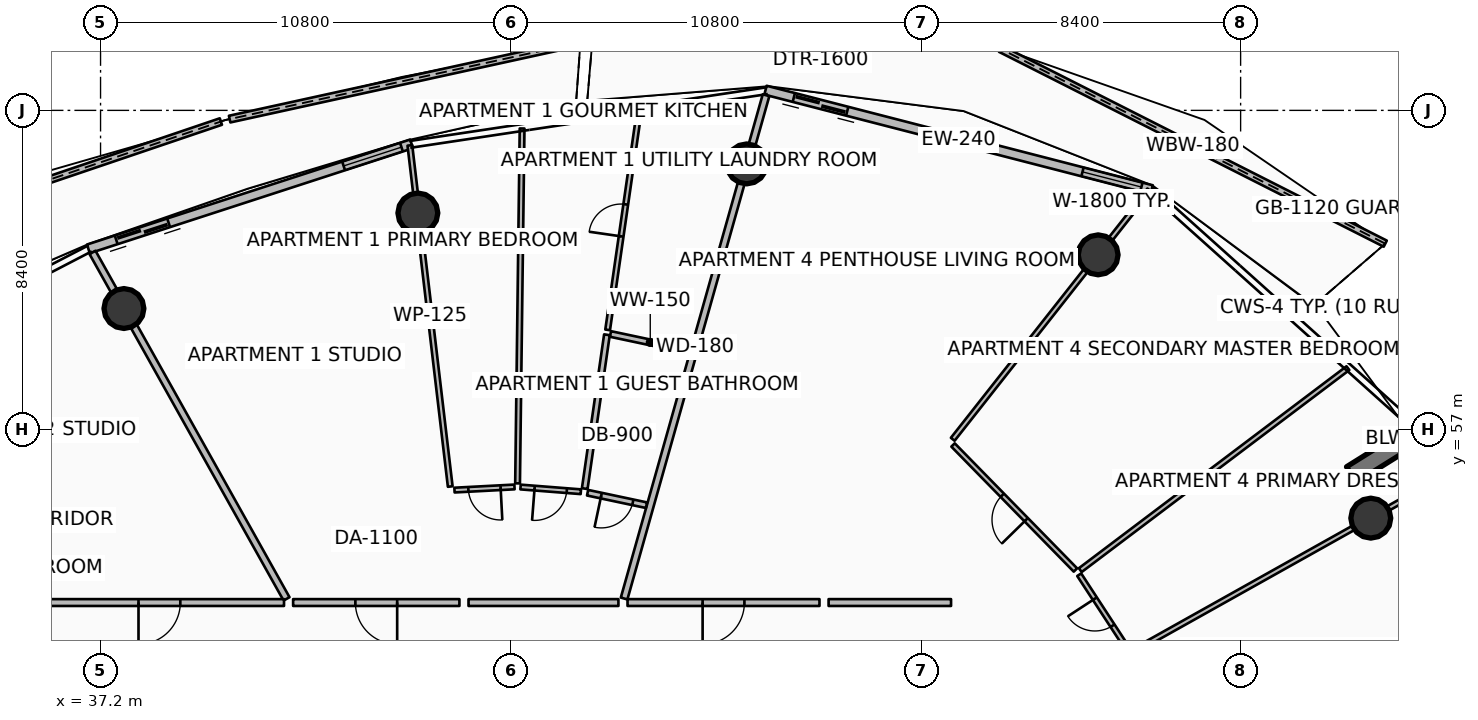
"""IFC4 building model, lengths in metres.
Left out: names, types, materials, properties, quantities, classifications, styles, units other than length and angle.
Written with IfcOpenShell. Run it as: python <this file> out.ifc"""

import sys

from ifc_helpers import new_model, si_unit, direction, frame, frame_2d, origin, origin_2d, place, context, subcontext, project, spatial, polyline, rectangle, circle, outline, extrude, element, fill, save


model = new_model("IFC4")
c1 = context("Model", 3, precision=1e-05, world=origin(), true_north=direction((0.0, 1.0)))
c2 = subcontext(c1, "Body", "Model", "MODEL_VIEW")
j1 = project(units=[si_unit("LENGTHUNIT", "METRE"), si_unit("PLANEANGLEUNIT", "RADIAN")], contexts=[c1])
p1 = place(None, origin())
s1 = spatial("IfcSite", under=j1, at=p1, CompositionType="ELEMENT")
p2 = place(p1, origin())
s2 = spatial("IfcBuilding", under=s1, at=p2, CompositionType="ELEMENT")
p3 = place(p2, frame((0.0, 0.0, 202.8)))
s3 = spatial("IfcBuildingStorey", under=s2, at=p3, CompositionType="ELEMENT", Elevation=202.8)
p4 = place(p3, frame((70.114, 55.818, 0.0), z_axis=(0.0, 0.0, 1.0), x_axis=(0.848033572426, 0.529942506352, 0.0)))
e1 = element("IfcWall", 1, at=p4, inside=s3, PredefinedType="SOLIDWALL", context=c2, shape_type="SweptSolid", body=[
    extrude(rectangle(XDim=3.5, YDim=0.48, at=frame_2d((1.75, 0.0))), origin(), (0.0, 0.0, 1.0), 3.75),
])
for number, where, z_axis, x_axis in (
    (2, (70.625, 54.671, 0.0), (0.0, 0.0, 1.0), (1.0, 0.0, 0.0)),
    (3, (63.451, 61.599, 0.0), (0.0, 0.0, 1.0), (1.0, 0.0, 0.0)),
    (4, (54.202, 63.992, 0.0), (0.0, 0.0, 1.0), (1.0, 0.0, 0.0)),
    (5, (45.55, 62.7, 0.0), (0.0, 0.0, 1.0), (1.0, 0.0, 0.0)),
    (6, (37.815, 60.186, 0.0), (0.0, 0.0, 1.0), (1.0, 0.0, 0.0)),
):
    element("IfcColumn", number, at=place(p3, frame(where, z_axis=z_axis, x_axis=x_axis)), inside=s3, PredefinedType="COLUMN", context=c2, shape_type="SweptSolid", body=[
        extrude(circle(Radius=0.525, at=origin_2d()), origin(), (0.0, 0.0, 1.0), 3.5),
    ])
p5 = place(p3, frame((71.006, 61.893, 0.0), z_axis=(0.0, 0.0, 1.0), x_axis=(-0.892126203774, 0.451786273076, 0.0)))
e7 = element("IfcWall", 7, at=p5, inside=s3, PredefinedType="PARAPET", context=c2, shape_type="SweptSolid", body=[
    extrude(outline(polyline([(0.0, 0.0), (11.347, 0.0), (11.347, 1.348), (5.674, 1.562), (0.0, 1.747), (0.0, 0.0)])), frame((0.0, 0.09, 0.0), z_axis=(0.0, -1.0, 0.0), x_axis=(1.0, 0.0, 0.0)), (0.0, 0.0, 1.0), 0.18),
])
p6 = place(p3, frame((49.828, 67.193, 0.0), z_axis=(0.0, 0.0, 1.0), x_axis=(-0.976834914213, -0.213994276499, 0.0)))
e8 = element("IfcWall", 8, at=p6, inside=s3, PredefinedType="PARAPET", context=c2, shape_type="SweptSolid", body=[
    extrude(outline(polyline([(0.0, 0.0), (9.45, 0.0), (9.45, 1.348), (4.725, 1.182), (0.0, 1.12), (0.0, 0.0)])), frame((0.0, 0.09, 0.0), z_axis=(0.0, -1.0, 0.0), x_axis=(1.0, 0.0, 0.0)), (0.0, 0.0, 1.0), 0.18),
])
p7 = place(p3, frame((40.366, 65.106, 0.0), z_axis=(0.0, 0.0, 1.0), x_axis=(-0.947048433124, -0.32109074312, 0.0)))
e9 = element("IfcWall", 9, at=p7, inside=s3, PredefinedType="PARAPET", context=c2, shape_type="SweptSolid", body=[
    extrude(outline(polyline([(0.0, 0.0), (9.736, 0.0), (9.736, 1.747), (4.868, 1.562), (0.0, 1.348), (0.0, 0.0)])), frame((0.0, 0.09, 0.0), z_axis=(0.0, -1.0, 0.0), x_axis=(1.0, 0.0, 0.0)), (0.0, 0.0, 1.0), 0.18),
])
p8 = place(p3, frame((64.86, 63.313, 0.0), z_axis=(0.0, 0.0, 1.0), x_axis=(-0.968374028006, 0.249502989727, 0.0)))
e10 = element("IfcWall", 10, at=p8, inside=s3, PredefinedType="SOLIDWALL", context=c2, shape_type="SweptSolid", body=[
    extrude(rectangle(XDim=10.494, YDim=0.24, at=frame_2d((5.247, 0.0))), origin(), (0.0, 0.0, 1.0), 2.45),
])
p9 = place(p8, frame((8.274, 0.0, 0.0)))
e11 = element("IfcOpeningElement", 11, at=p9, cuts=e10, PredefinedType="OPENING", context=c2, shape_type="SweptSolid", body=[
    extrude(rectangle(XDim=1.45, YDim=2.15, at=frame_2d((0.725, 1.075))), frame((0.0, 0.13, 0.0), z_axis=(0.0, -1.0, 0.0), x_axis=(1.0, 0.0, 0.0)), (0.0, 0.0, 1.0), 0.26),
])
p10 = place(p8, frame((0.28, 0.0, 0.65)))
e12 = element("IfcOpeningElement", 12, at=p10, cuts=e10, PredefinedType="OPENING", context=c2, shape_type="SweptSolid", body=[
    extrude(rectangle(XDim=1.6, YDim=1.5, at=frame_2d((0.8, 0.75))), frame((0.0, 0.13, 0.0), z_axis=(0.0, -1.0, 0.0), x_axis=(1.0, 0.0, 0.0)), (0.0, 0.0, 1.0), 0.26),
])
p11 = place(p3, frame((45.384, 64.519, 0.0), z_axis=(0.0, 0.0, 1.0), x_axis=(-0.951058543936, -0.309010753869, 0.0)))
e13 = element("IfcWall", 13, at=p11, inside=s3, PredefinedType="SOLIDWALL", context=c2, shape_type="SweptSolid", body=[
    extrude(rectangle(XDim=8.942, YDim=0.24, at=frame_2d((4.471, 0.0))), origin(), (0.0, 0.0, 1.0), 2.45),
])
p12 = place(p11, frame((6.722, 0.0, 0.0)))
e14 = element("IfcOpeningElement", 14, at=p12, cuts=e13, PredefinedType="OPENING", context=c2, shape_type="SweptSolid", body=[
    extrude(rectangle(XDim=1.45, YDim=2.15, at=frame_2d((0.725, 1.075))), frame((0.0, 0.13, 0.0), z_axis=(0.0, -1.0, 0.0), x_axis=(1.0, 0.0, 0.0)), (0.0, 0.0, 1.0), 0.26),
])
p13 = place(p11, frame((0.28, 0.0, 0.65)))
e15 = element("IfcOpeningElement", 15, at=p13, cuts=e13, PredefinedType="OPENING", context=c2, shape_type="SweptSolid", body=[
    extrude(rectangle(XDim=1.6, YDim=1.5, at=frame_2d((0.8, 0.75))), frame((0.0, 0.13, 0.0), z_axis=(0.0, -1.0, 0.0), x_axis=(1.0, 0.0, 0.0)), (0.0, 0.0, 1.0), 0.26),
])
p14 = place(p3, frame((50.977, 52.556, 0.0), z_axis=(0.0, 0.0, 1.0), x_axis=(0.271443307373, 0.962454430548, 0.0)))
e16 = element("IfcWall", 16, at=p14, inside=s3, PredefinedType="PARTITIONING", context=c2, shape_type="SweptSolid", body=[
    extrude(rectangle(XDim=13.759, YDim=0.18, at=frame_2d((6.88, 0.0))), origin(), (0.0, 0.0, 1.0), 2.94),
])
p15 = place(p3, frame((42.094, 52.546, 0.0), z_axis=(0.0, 0.0, 1.0), x_axis=(-0.488614041717, 0.872500039104, 0.0)))
e17 = element("IfcWall", 17, at=p15, inside=s3, PredefinedType="PARTITIONING", context=c2, shape_type="SweptSolid", body=[
    extrude(rectangle(XDim=10.448, YDim=0.18, at=frame_2d((5.224, 0.0))), origin(), (0.0, 0.0, 1.0), 2.94),
])
p16 = place(p3, frame((46.643, 52.45, 0.0), z_axis=(0.0, 0.0, 1.0), x_axis=(-1.0, 0.0, 0.0)))
e18 = element("IfcWall", 18, at=p16, inside=s3, PredefinedType="PARTITIONING", context=c2, shape_type="SweptSolid", body=[
    extrude(rectangle(XDim=4.376, YDim=0.18, at=frame_2d((2.188, 0.0))), origin(), (0.0, 0.0, 1.0), 2.94),
])
p17 = place(p16, frame((1.638, 0.0, 0.0)))
e19 = element("IfcOpeningElement", 19, at=p17, cuts=e18, PredefinedType="OPENING", context=c2, shape_type="SweptSolid", body=[
    extrude(rectangle(XDim=1.1, YDim=2.1, at=frame_2d((0.55, 1.05))), frame((0.0, 0.1, 0.0), z_axis=(0.0, -1.0, 0.0), x_axis=(1.0, 0.0, 0.0)), (0.0, 0.0, 1.0), 0.2),
])
p18 = place(p3, frame((50.827, 52.45, 0.0), z_axis=(0.0, 0.0, 1.0), x_axis=(-1.0, 0.0, 0.0)))
e20 = element("IfcWall", 20, at=p18, inside=s3, PredefinedType="PARTITIONING", context=c2, shape_type="SweptSolid", body=[
    extrude(rectangle(XDim=3.944, YDim=0.18, at=frame_2d((1.972, 0.0))), origin(), (0.0, 0.0, 1.0), 2.94),
])
p19 = place(p3, frame((46.402, 55.503, 0.0), z_axis=(0.0, 0.0, 1.0), x_axis=(-0.117526089467, 0.993069795279, 0.0)))
e21 = element("IfcWall", 21, at=p19, inside=s3, PredefinedType="PARTITIONING", context=c2, shape_type="SweptSolid", body=[
    extrude(rectangle(XDim=9.039, YDim=0.125, at=frame_2d((4.519, 0.0))), origin(), (0.0, 0.0, 1.0), 2.94),
])
p20 = place(p3, frame((51.566, 55.011, 0.0), z_axis=(0.0, 0.0, 1.0), x_axis=(-0.978219904541, 0.207571236833, 0.0)))
e22 = element("IfcWall", 22, at=p20, inside=s3, PredefinedType="PARTITIONING", context=c2, shape_type="SweptSolid", body=[
    extrude(rectangle(XDim=1.584, YDim=0.15, at=frame_2d((0.792, 0.0))), origin(), (0.0, 0.0, 1.0), 2.94),
])
p21 = place(p20, frame((0.367, 0.0, 0.0)))
e23 = element("IfcOpeningElement", 23, at=p21, cuts=e22, PredefinedType="OPENING", context=c2, shape_type="SweptSolid", body=[
    extrude(rectangle(XDim=0.85, YDim=2.06, at=frame_2d((0.425, 1.03))), frame((0.0, 0.085, 0.0), z_axis=(0.0, -1.0, 0.0), x_axis=(1.0, 0.0, 0.0)), (0.0, 0.0, 1.0), 0.17),
])
p22 = place(p3, frame((52.711, 59.073, 0.0), z_axis=(0.0, 0.0, 1.0), x_axis=(-0.978208139302, 0.207626675075, 0.0)))
e24 = element("IfcWall", 24, at=p22, inside=s3, PredefinedType="PARTITIONING", context=c2, shape_type="SweptSolid", body=[
    extrude(rectangle(XDim=2.139, YDim=0.15, at=frame_2d((1.069, 0.0))), origin(), (0.0, 0.0, 1.0), 2.94),
])
p23 = place(p3, frame((49.941, 55.448, 0.0), z_axis=(0.0, 0.0, 1.0), x_axis=(0.142850308916, 0.989744304981, 0.0)))
e25 = element("IfcWall", 25, at=p23, inside=s3, PredefinedType="PARTITIONING", context=c2, shape_type="SweptSolid", body=[
    extrude(rectangle(XDim=4.09, YDim=0.15, at=frame_2d((2.045, 0.0))), origin(), (0.0, 0.0, 1.0), 2.94),
])
p24 = place(p3, frame((50.544, 59.625, 0.0), z_axis=(0.0, 0.0, 1.0), x_axis=(0.142847588942, 0.989744697553, 0.0)))
e26 = element("IfcWall", 26, at=p24, inside=s3, PredefinedType="PARTITIONING", context=c2, shape_type="SweptSolid", body=[
    extrude(rectangle(XDim=5.823, YDim=0.125, at=frame_2d((2.912, 0.0))), origin(), (0.0, 0.0, 1.0), 2.94),
])
p25 = place(p24, frame((2.487, 0.0, 0.0)))
e27 = element("IfcOpeningElement", 27, at=p25, cuts=e26, PredefinedType="OPENING", context=c2, shape_type="SweptSolid", body=[
    extrude(rectangle(XDim=0.85, YDim=2.06, at=frame_2d((0.425, 1.03))), frame((0.0, 0.073, 0.0), z_axis=(0.0, -1.0, 0.0), x_axis=(1.0, 0.0, 0.0)), (0.0, 0.0, 1.0), 0.145),
])
p26 = place(p3, frame((48.173, 55.586, 0.0), z_axis=(0.0, 0.0, 1.0), x_axis=(0.012758799277, 0.999918603208, 0.0)))
e28 = element("IfcWall", 28, at=p26, inside=s3, PredefinedType="PARTITIONING", context=c2, shape_type="SweptSolid", body=[
    extrude(rectangle(XDim=9.338, YDim=0.125, at=frame_2d((4.669, 0.0))), origin(), (0.0, 0.0, 1.0), 2.94),
])
p27 = place(p3, frame((49.838, 55.365, 0.0), z_axis=(0.0, 0.0, 1.0), x_axis=(-0.996945175666, 0.078104524306, 0.0)))
e29 = element("IfcWall", 29, at=p27, inside=s3, PredefinedType="PARTITIONING", context=c2, shape_type="SweptSolid", body=[
    extrude(rectangle(XDim=1.591, YDim=0.125, at=frame_2d((0.795, 0.0))), origin(), (0.0, 0.0, 1.0), 2.94),
])
p28 = place(p27, frame((0.371, 0.0, 0.0)))
e30 = element("IfcOpeningElement", 30, at=p28, cuts=e29, PredefinedType="OPENING", context=c2, shape_type="SweptSolid", body=[
    extrude(rectangle(XDim=0.85, YDim=2.06, at=frame_2d((0.425, 1.03))), frame((0.0, 0.073, 0.0), z_axis=(0.0, -1.0, 0.0), x_axis=(1.0, 0.0, 0.0)), (0.0, 0.0, 1.0), 0.145),
])
p29 = place(p3, frame((48.092, 55.492, 0.0), z_axis=(0.0, 0.0, 1.0), x_axis=(-0.998620813703, -0.052502099375, 0.0)))
e31 = element("IfcWall", 31, at=p29, inside=s3, PredefinedType="PARTITIONING", context=c2, shape_type="SweptSolid", body=[
    extrude(rectangle(XDim=1.581, YDim=0.125, at=frame_2d((0.791, 0.0))), origin(), (0.0, 0.0, 1.0), 2.94),
])
p30 = place(p29, frame((0.365, 0.0, 0.0)))
e32 = element("IfcOpeningElement", 32, at=p30, cuts=e31, PredefinedType="OPENING", context=c2, shape_type="SweptSolid", body=[
    extrude(rectangle(XDim=0.85, YDim=2.06, at=frame_2d((0.425, 1.03))), frame((0.0, 0.073, 0.0), z_axis=(0.0, -1.0, 0.0), x_axis=(1.0, 0.0, 0.0)), (0.0, 0.0, 1.0), 0.145),
])
p31 = place(p3, frame((42.028, 52.45, 0.0), z_axis=(0.0, 0.0, 1.0), x_axis=(-1.0, 0.0, 0.0)))
e33 = element("IfcWall", 33, at=p31, inside=s3, PredefinedType="PARTITIONING", context=c2, shape_type="SweptSolid", body=[
    extrude(rectangle(XDim=6.558, YDim=0.18, at=frame_2d((3.279, 0.0))), origin(), (0.0, 0.0, 1.0), 2.94),
])
p32 = place(p31, frame((2.729, 0.0, 0.0)))
e34 = element("IfcOpeningElement", 34, at=p32, cuts=e33, PredefinedType="OPENING", context=c2, shape_type="SweptSolid", body=[
    extrude(rectangle(XDim=1.1, YDim=2.1, at=frame_2d((0.55, 1.05))), frame((0.0, 0.1, 0.0), z_axis=(0.0, -1.0, 0.0), x_axis=(1.0, 0.0, 0.0)), (0.0, 0.0, 1.0), 0.2),
])
p33 = place(p3, frame((56.118, 52.45, 0.0), z_axis=(0.0, 0.0, 1.0), x_axis=(-1.0, 0.0, 0.0)))
e35 = element("IfcWall", 35, at=p33, inside=s3, PredefinedType="PARTITIONING", context=c2, shape_type="SweptSolid", body=[
    extrude(rectangle(XDim=5.051, YDim=0.18, at=frame_2d((2.525, 0.0))), origin(), (0.0, 0.0, 1.0), 2.94),
])
p34 = place(p33, frame((1.975, 0.0, 0.0)))
e36 = element("IfcOpeningElement", 36, at=p34, cuts=e35, PredefinedType="OPENING", context=c2, shape_type="SweptSolid", body=[
    extrude(rectangle(XDim=1.1, YDim=2.1, at=frame_2d((0.55, 1.05))), frame((0.0, 0.1, 0.0), z_axis=(0.0, -1.0, 0.0), x_axis=(1.0, 0.0, 0.0)), (0.0, 0.0, 1.0), 0.2),
])
p35 = place(p3, frame((59.58, 52.45, 0.0), z_axis=(0.0, 0.0, 1.0), x_axis=(-1.0, 0.0, 0.0)))
e37 = element("IfcWall", 37, at=p35, inside=s3, PredefinedType="PARTITIONING", context=c2, shape_type="SweptSolid", body=[
    extrude(rectangle(XDim=3.222, YDim=0.18, at=frame_2d((1.611, 0.0))), origin(), (0.0, 0.0, 1.0), 2.94),
])
p36 = place(p3, frame((64.383, 51.175, 0.0), z_axis=(0.0, 0.0, 1.0), x_axis=(0.872496427588, 0.488620490611, 0.0)))
e38 = element("IfcWall", 38, at=p36, inside=s3, PredefinedType="PARTITIONING", context=c2, shape_type="SweptSolid", body=[
    extrude(rectangle(XDim=9.118, YDim=0.125, at=frame_2d((4.559, 0.0))), origin(), (0.0, 0.0, 1.0), 2.94),
])
p37 = place(p3, frame((59.625, 56.746, 0.0), z_axis=(0.0, 0.0, 1.0), x_axis=(0.619083134383, 0.785325456561, 0.0)))
e39 = element("IfcWall", 39, at=p37, inside=s3, PredefinedType="PARTITIONING", context=c2, shape_type="SweptSolid", body=[
    extrude(rectangle(XDim=8.353, YDim=0.125, at=frame_2d((4.177, 0.0))), origin(), (0.0, 0.0, 1.0), 2.94),
])
p38 = place(p3, frame((62.981, 53.303, 0.0), z_axis=(0.0, 0.0, 1.0), x_axis=(0.798266473747, 0.602304438711, 0.0)))
e40 = element("IfcWall", 40, at=p38, inside=s3, PredefinedType="PARTITIONING", context=c2, shape_type="SweptSolid", body=[
    extrude(rectangle(XDim=8.822, YDim=0.125, at=frame_2d((4.411, 0.0))), origin(), (0.0, 0.0, 1.0), 2.94),
])
p39 = place(p3, frame((64.241, 51.21, 0.0), z_axis=(0.0, 0.0, 1.0), x_axis=(-0.546782970229, 0.837274377649, 0.0)))
e41 = element("IfcWall", 41, at=p39, inside=s3, PredefinedType="PARTITIONING", context=c2, shape_type="SweptSolid", body=[
    extrude(rectangle(XDim=2.356, YDim=0.125, at=frame_2d((1.178, 0.0))), origin(), (0.0, 0.0, 1.0), 2.94),
])
p40 = place(p39, frame((0.753, 0.0, 0.0)))
e42 = element("IfcOpeningElement", 42, at=p40, cuts=e41, PredefinedType="OPENING", context=c2, shape_type="SweptSolid", body=[
    extrude(rectangle(XDim=0.85, YDim=2.06, at=frame_2d((0.425, 1.03))), frame((0.0, 0.073, 0.0), z_axis=(0.0, -1.0, 0.0), x_axis=(1.0, 0.0, 0.0)), (0.0, 0.0, 1.0), 0.145),
])
p41 = place(p3, frame((62.853, 53.306, 0.0), z_axis=(0.0, 0.0, 1.0), x_axis=(-0.699562743434, 0.714571177699, 0.0)))
e43 = element("IfcWall", 43, at=p41, inside=s3, PredefinedType="PARTITIONING", context=c2, shape_type="SweptSolid", body=[
    extrude(rectangle(XDim=4.604, YDim=0.125, at=frame_2d((2.302, 0.0))), origin(), (0.0, 0.0, 1.0), 2.94),
])
p42 = place(p41, frame((1.852, 0.0, 0.0)))
e44 = element("IfcOpeningElement", 44, at=p42, cuts=e43, PredefinedType="OPENING", context=c2, shape_type="SweptSolid", body=[
    extrude(rectangle(XDim=0.9, YDim=2.08, at=frame_2d((0.45, 1.04))), frame((0.0, 0.073, 0.0), z_axis=(0.0, -1.0, 0.0), x_axis=(1.0, 0.0, 0.0)), (0.0, 0.0, 1.0), 0.145),
])
p43 = place(p9, origin())
e45 = element("IfcDoor", 45, at=p43, inside=s3, OperationType="DOUBLE_DOOR_SLIDING", PredefinedType="DOOR", context=c2, shape_type="SweptSolid", body=[
    extrude(rectangle(XDim=1.45, YDim=2.15, at=frame_2d((0.725, 1.075))), frame((0.0, 0.025, 0.0), z_axis=(0.0, -1.0, 0.0), x_axis=(1.0, 0.0, 0.0)), (0.0, 0.0, 1.0), 0.05),
])
fill(e11, e45)
p44 = place(p10, origin())
e46 = element("IfcWindow", 46, at=p44, inside=s3, PartitioningType="SINGLE_PANEL", PredefinedType="WINDOW", context=c2, shape_type="SweptSolid", body=[
    extrude(rectangle(XDim=1.6, YDim=1.5, at=frame_2d((0.8, 0.75))), frame((0.0, 0.03, 0.0), z_axis=(0.0, -1.0, 0.0), x_axis=(1.0, 0.0, 0.0)), (0.0, 0.0, 1.0), 0.06),
])
fill(e12, e46)
p45 = place(p12, origin())
e47 = element("IfcDoor", 47, at=p45, inside=s3, OperationType="DOUBLE_DOOR_SLIDING", PredefinedType="DOOR", context=c2, shape_type="SweptSolid", body=[
    extrude(rectangle(XDim=1.45, YDim=2.15, at=frame_2d((0.725, 1.075))), frame((0.0, 0.025, 0.0), z_axis=(0.0, -1.0, 0.0), x_axis=(1.0, 0.0, 0.0)), (0.0, 0.0, 1.0), 0.05),
])
fill(e14, e47)
p46 = place(p13, origin())
e48 = element("IfcWindow", 48, at=p46, inside=s3, PartitioningType="SINGLE_PANEL", PredefinedType="WINDOW", context=c2, shape_type="SweptSolid", body=[
    extrude(rectangle(XDim=1.6, YDim=1.5, at=frame_2d((0.8, 0.75))), frame((0.0, 0.03, 0.0), z_axis=(0.0, -1.0, 0.0), x_axis=(1.0, 0.0, 0.0)), (0.0, 0.0, 1.0), 0.06),
])
fill(e15, e48)
p47 = place(p17, origin())
e49 = element("IfcDoor", 49, at=p47, inside=s3, OperationType="SINGLE_SWING_LEFT", PredefinedType="DOOR", context=c2, shape_type="SweptSolid", body=[
    extrude(rectangle(XDim=1.1, YDim=2.1, at=frame_2d((0.55, 1.05))), frame((0.0, 0.025, 0.0), z_axis=(0.0, -1.0, 0.0), x_axis=(1.0, 0.0, 0.0)), (0.0, 0.0, 1.0), 0.05),
])
fill(e19, e49)
p48 = place(p21, origin())
e50 = element("IfcDoor", 50, at=p48, inside=s3, OperationType="SINGLE_SWING_RIGHT", PredefinedType="DOOR", context=c2, shape_type="SweptSolid", body=[
    extrude(rectangle(XDim=0.85, YDim=2.06, at=frame_2d((0.425, 1.03))), frame((0.0, 0.025, 0.0), z_axis=(0.0, -1.0, 0.0), x_axis=(1.0, 0.0, 0.0)), (0.0, 0.0, 1.0), 0.05),
])
fill(e23, e50)
p49 = place(p25, origin())
e51 = element("IfcDoor", 51, at=p49, inside=s3, OperationType="SINGLE_SWING_LEFT", PredefinedType="DOOR", context=c2, shape_type="SweptSolid", body=[
    extrude(rectangle(XDim=0.85, YDim=2.06, at=frame_2d((0.425, 1.03))), frame((0.0, 0.025, 0.0), z_axis=(0.0, -1.0, 0.0), x_axis=(1.0, 0.0, 0.0)), (0.0, 0.0, 1.0), 0.05),
])
fill(e27, e51)
p50 = place(p28, origin())
e52 = element("IfcDoor", 52, at=p50, inside=s3, OperationType="SINGLE_SWING_RIGHT", PredefinedType="DOOR", context=c2, shape_type="SweptSolid", body=[
    extrude(rectangle(XDim=0.85, YDim=2.06, at=frame_2d((0.425, 1.03))), frame((0.0, 0.025, 0.0), z_axis=(0.0, -1.0, 0.0), x_axis=(1.0, 0.0, 0.0)), (0.0, 0.0, 1.0), 0.05),
])
fill(e30, e52)
p51 = place(p30, origin())
e53 = element("IfcDoor", 53, at=p51, inside=s3, OperationType="SINGLE_SWING_LEFT", PredefinedType="DOOR", context=c2, shape_type="SweptSolid", body=[
    extrude(rectangle(XDim=0.85, YDim=2.06, at=frame_2d((0.425, 1.03))), frame((0.0, 0.025, 0.0), z_axis=(0.0, -1.0, 0.0), x_axis=(1.0, 0.0, 0.0)), (0.0, 0.0, 1.0), 0.05),
])
fill(e32, e53)
p52 = place(p32, origin())
e54 = element("IfcDoor", 54, at=p52, inside=s3, OperationType="SINGLE_SWING_RIGHT", PredefinedType="DOOR", context=c2, shape_type="SweptSolid", body=[
    extrude(rectangle(XDim=1.1, YDim=2.1, at=frame_2d((0.55, 1.05))), frame((0.0, 0.025, 0.0), z_axis=(0.0, -1.0, 0.0), x_axis=(1.0, 0.0, 0.0)), (0.0, 0.0, 1.0), 0.05),
])
fill(e34, e54)
p53 = place(p34, origin())
e55 = element("IfcDoor", 55, at=p53, inside=s3, OperationType="SINGLE_SWING_RIGHT", PredefinedType="DOOR", context=c2, shape_type="SweptSolid", body=[
    extrude(rectangle(XDim=1.1, YDim=2.1, at=frame_2d((0.55, 1.05))), frame((0.0, 0.025, 0.0), z_axis=(0.0, -1.0, 0.0), x_axis=(1.0, 0.0, 0.0)), (0.0, 0.0, 1.0), 0.05),
])
fill(e36, e55)
p54 = place(p40, origin())
e56 = element("IfcDoor", 56, at=p54, inside=s3, OperationType="SINGLE_SWING_RIGHT", PredefinedType="DOOR", context=c2, shape_type="SweptSolid", body=[
    extrude(rectangle(XDim=0.85, YDim=2.06, at=frame_2d((0.425, 1.03))), frame((0.0, 0.025, 0.0), z_axis=(0.0, -1.0, 0.0), x_axis=(1.0, 0.0, 0.0)), (0.0, 0.0, 1.0), 0.05),
])
fill(e42, e56)
p55 = place(p42, origin())
e57 = element("IfcDoor", 57, at=p55, inside=s3, OperationType="SINGLE_SWING_LEFT", PredefinedType="DOOR", context=c2, shape_type="SweptSolid", body=[
    extrude(rectangle(XDim=0.9, YDim=2.08, at=frame_2d((0.45, 1.04))), frame((0.0, 0.025, 0.0), z_axis=(0.0, -1.0, 0.0), x_axis=(1.0, 0.0, 0.0)), (0.0, 0.0, 1.0), 0.05),
])
fill(e44, e57)
save(model, sys.argv[1])
